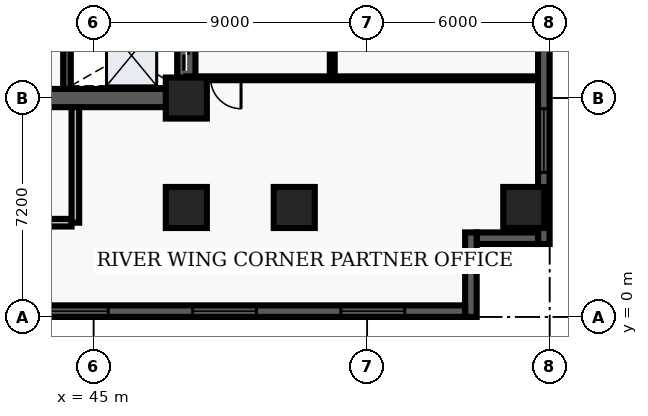
"""IFC4 building model, lengths in metres.
Left out: names, types, materials, properties, quantities, classifications, styles, units other than length and angle.
Written with IfcOpenShell. Run it as: python <this file> out.ifc"""

import sys

from ifc_helpers import new_model, entity, si_unit, converted_unit, direction, frame, origin_with_axes, origin_2d_with_axis, place, context, subcontext, project, spatial, polyline, rectangle, outline, extrude, element, fill, save


model = new_model("IFC4")
c1 = context("Model", 3, precision=1e-05, world=origin_with_axes(), true_north=direction((0.0, 1.0)))
c2 = subcontext(c1, "Body", "Model", "MODEL_VIEW")
j1 = project(units=[si_unit("LENGTHUNIT", "METRE"), converted_unit("PLANEANGLEUNIT", "DEGREE", entity("IfcPlaneAngleMeasure", 0.017), si_unit("PLANEANGLEUNIT", "RADIAN"), dimensions=[0, 0, 0, 0, 0, 0, 0])], contexts=[c1])
p1 = place(None, origin_with_axes())
s1 = spatial("IfcSite", under=j1, at=p1, CompositionType="ELEMENT")
p2 = place(p1, origin_with_axes())
s2 = spatial("IfcBuilding", under=s1, at=p2, CompositionType="ELEMENT")
p3 = place(p2, frame((0.0, 0.0, 52.2), z_axis=(0.0, 0.0, 1.0), x_axis=(1.0, 0.0, 0.0)))
s3 = spatial("IfcBuildingStorey", under=s2, at=p3, CompositionType="ELEMENT", Elevation=52.2)
p4 = place(p3, frame((40.2, 7.2, 0.0), z_axis=(0.0, 0.0, 1.0), x_axis=(1.0, 0.0, 0.0)))
e1 = element("IfcWall", 1, at=p4, inside=s3, PredefinedType="SHEAR", context=c2, shape_type="SweptSolid", body=[
    extrude(outline(polyline([(0.0, -0.3), (7.85, -0.3), (7.85, 0.3), (0.0, 0.3), (0.0, -0.3)])), origin_with_axes(), (0.0, 0.0, 1.0), 3.66),
])
p5 = place(p4, frame((2.175, 0.0, 0.0), z_axis=(0.0, 0.0, 1.0), x_axis=(1.0, 0.0, 0.0)))
e2 = element("IfcOpeningElement", 2, at=p5, cuts=e1, PredefinedType="OPENING", context=c2, shape_type="SweptSolid", body=[
    extrude(rectangle(XDim=1.05, YDim=0.62, at=origin_2d_with_axis()), origin_with_axes(), (0.0, 0.0, 1.0), 2.15),
])
p6 = place(p3, frame((48.05, 7.2, 0.0), z_axis=(0.0, 0.0, 1.0), x_axis=(0.0, 1.0, 0.0)))
e3 = element("IfcWall", 3, at=p6, inside=s3, PredefinedType="SHEAR", context=c2, shape_type="SweptSolid", body=[
    extrude(outline(polyline([(0.0, -0.3), (15.6, -0.3), (15.6, 0.3), (0.0, 0.3), (0.0, -0.3)])), origin_with_axes(), (0.0, 0.0, 1.0), 3.66),
])
p7 = place(p6, frame((1.425, 0.0, 0.0), z_axis=(0.0, 0.0, 1.0), x_axis=(1.0, 0.0, 0.0)))
e4 = element("IfcOpeningElement", 4, at=p7, cuts=e3, PredefinedType="OPENING", context=c2, shape_type="SweptSolid", body=[
    extrude(rectangle(XDim=1.05, YDim=0.62, at=origin_2d_with_axis()), origin_with_axes(), (0.0, 0.0, 1.0), 2.15),
])
p8 = place(p6, frame((3.475, 0.0, 0.0), z_axis=(0.0, 0.0, 1.0), x_axis=(1.0, 0.0, 0.0)))
e5 = element("IfcOpeningElement", 5, at=p8, cuts=e3, PredefinedType="OPENING", context=c2, shape_type="SweptSolid", body=[
    extrude(rectangle(XDim=1.05, YDim=0.62, at=origin_2d_with_axis()), origin_with_axes(), (0.0, 0.0, 1.0), 2.15),
])
p9 = place(p6, frame((5.625, 0.0, 0.0), z_axis=(0.0, 0.0, 1.0), x_axis=(1.0, 0.0, 0.0)))
e6 = element("IfcOpeningElement", 6, at=p9, cuts=e3, PredefinedType="OPENING", context=c2, shape_type="SweptSolid", body=[
    extrude(rectangle(XDim=0.95, YDim=0.62, at=origin_2d_with_axis()), origin_with_axes(), (0.0, 0.0, 1.0), 2.15),
])
p10 = place(p3, frame((44.125, 7.5, 0.0), z_axis=(0.0, 0.0, 1.0), x_axis=(0.0, 1.0, 0.0)))
e7 = element("IfcWall", 7, at=p10, inside=s3, PredefinedType="SHEAR", context=c2, shape_type="SweptSolid", body=[
    extrude(outline(polyline([(0.0, -0.125), (15.0, -0.125), (15.0, 0.125), (0.0, 0.125), (0.0, -0.125)])), origin_with_axes(), (0.0, 0.0, 1.0), 3.66),
])
p11 = place(p3, frame((40.325, 3.1, 0.0), z_axis=(0.0, 0.0, 1.0), x_axis=(1.0, 0.0, 0.0)))
e8 = element("IfcWall", 8, at=p11, inside=s3, PredefinedType="SOLIDWALL", context=c2, shape_type="SweptSolid", body=[
    extrude(outline(polyline([(0.0, -0.125), (3.95, -0.125), (3.95, 0.125), (0.0, 0.125), (0.0, -0.125)])), origin_with_axes(), (0.0, 0.0, 1.0), 2.7),
])
p12 = place(p3, frame((44.4, 3.1, 0.0), z_axis=(0.0, 0.0, 1.0), x_axis=(0.0, 1.0, 0.0)))
e9 = element("IfcWall", 9, at=p12, inside=s3, PredefinedType="SOLIDWALL", context=c2, shape_type="SweptSolid", body=[
    extrude(outline(polyline([(0.0, -0.125), (3.8, -0.125), (3.8, 0.125), (0.0, 0.125), (0.0, -0.125)])), origin_with_axes(), (0.0, 0.0, 1.0), 2.7),
])
for number, where, z_axis, x_axis in (
    (10, (48.05, 3.6, 0.0), (0.0, 0.0, 1.0), (1.0, 0.0, 0.0)),
    (11, (48.05, 7.2, 0.0), (0.0, 0.0, 1.0), (1.0, 0.0, 0.0)),
    (12, (51.6, 3.6, 0.0), (0.0, 0.0, 1.0), (1.0, 0.0, 0.0)),
    (13, (59.15, 3.6, 0.0), (0.0, 0.0, 1.0), (1.0, 0.0, 0.0)),
):
    element("IfcColumn", number, at=place(p3, frame(where, z_axis=z_axis, x_axis=x_axis)), inside=s3, PredefinedType="COLUMN", context=c2, shape_type="SweptSolid", body=[
        extrude(rectangle(XDim=1.35, YDim=1.35, at=origin_2d_with_axis()), origin_with_axes(), (0.0, 0.0, 1.0), 3.9),
    ])
p13 = place(p3, frame((52.85, 7.85, 0.0), z_axis=(0.0, 0.0, 1.0), x_axis=(0.0, 1.0, 0.0)))
e14 = element("IfcWall", 14, at=p13, inside=s3, PredefinedType="PARTITIONING", context=c2, shape_type="SweptSolid", body=[
    extrude(outline(polyline([(0.0, -0.08), (18.8, -0.08), (18.8, 0.08), (0.0, 0.08), (0.0, -0.08)])), origin_with_axes(), (0.0, 0.0, 1.0), 2.7),
])
p14 = place(p13, frame((4.484, 0.0, 0.0), z_axis=(0.0, 0.0, 1.0), x_axis=(1.0, 0.0, 0.0)))
e15 = element("IfcOpeningElement", 15, at=p14, cuts=e14, PredefinedType="OPENING", context=c2, shape_type="SweptSolid", body=[
    extrude(rectangle(XDim=1.0, YDim=0.18, at=origin_2d_with_axis()), origin_with_axes(), (0.0, 0.0, 1.0), 2.15),
])
p15 = place(p13, frame((7.687, 0.0, 0.0), z_axis=(0.0, 0.0, 1.0), x_axis=(1.0, 0.0, 0.0)))
e16 = element("IfcOpeningElement", 16, at=p15, cuts=e14, PredefinedType="OPENING", context=c2, shape_type="SweptSolid", body=[
    extrude(rectangle(XDim=1.0, YDim=0.18, at=origin_2d_with_axis()), origin_with_axes(), (0.0, 0.0, 1.0), 2.15),
])
p16 = place(p13, frame((13.79, 0.0, 0.0), z_axis=(0.0, 0.0, 1.0), x_axis=(1.0, 0.0, 0.0)))
e17 = element("IfcOpeningElement", 17, at=p16, cuts=e14, PredefinedType="OPENING", context=c2, shape_type="SweptSolid", body=[
    extrude(rectangle(XDim=1.0, YDim=0.18, at=origin_2d_with_axis()), origin_with_axes(), (0.0, 0.0, 1.0), 2.15),
])
p17 = place(p3, frame((59.64, 7.85, 0.0), z_axis=(0.0, 0.0, 1.0), x_axis=(-1.0, 0.0, 0.0)))
e18 = element("IfcWall", 18, at=p17, inside=s3, PredefinedType="PARTITIONING", context=c2, shape_type="SweptSolid", body=[
    extrude(outline(polyline([(0.0, -0.062), (11.59, -0.062), (11.59, 0.062), (0.0, 0.062), (0.0, -0.062)])), origin_with_axes(), (0.0, 0.0, 1.0), 2.7),
])
p18 = place(p17, frame((10.29, 0.0, 0.0), z_axis=(0.0, 0.0, 1.0), x_axis=(1.0, 0.0, 0.0)))
e19 = element("IfcOpeningElement", 19, at=p18, cuts=e18, PredefinedType="OPENING", context=c2, shape_type="SweptSolid", body=[
    extrude(rectangle(XDim=1.0, YDim=0.145, at=origin_2d_with_axis()), origin_with_axes(), (0.0, 0.0, 1.0), 2.15),
])
p19 = place(p3, frame((59.81, 26.02, 0.0), z_axis=(0.0, 0.0, 1.0), x_axis=(0.0, -1.0, 0.0)))
e20 = element("IfcWall", 20, at=p19, inside=s3, PredefinedType="SOLIDWALL", context=c2, shape_type="SweptSolid", body=[
    extrude(outline(polyline([(0.0, -0.19), (23.62, -0.19), (23.62, 0.19), (0.0, 0.19), (0.0, -0.19)])), origin_with_axes(), (0.0, 0.0, 1.0), 3.66),
])
p20 = place(p19, frame((3.853, 0.0, 0.45), z_axis=(0.0, 0.0, 1.0), x_axis=(1.0, 0.0, 0.0)))
e21 = element("IfcOpeningElement", 21, at=p20, cuts=e20, PredefinedType="OPENING", context=c2, shape_type="SweptSolid", body=[
    extrude(rectangle(XDim=2.1, YDim=0.4, at=origin_2d_with_axis()), origin_with_axes(), (0.0, 0.0, 1.0), 2.2),
])
p21 = place(p19, frame((20.218, 0.0, 0.45), z_axis=(0.0, 0.0, 1.0), x_axis=(1.0, 0.0, 0.0)))
e22 = element("IfcOpeningElement", 22, at=p21, cuts=e20, PredefinedType="OPENING", context=c2, shape_type="SweptSolid", body=[
    extrude(rectangle(XDim=2.1, YDim=0.4, at=origin_2d_with_axis()), origin_with_axes(), (0.0, 0.0, 1.0), 2.2),
])
p22 = place(p3, frame((59.62, 2.59, 0.0), z_axis=(0.0, 0.0, 1.0), x_axis=(-1.0, 0.0, 0.0)))
e23 = element("IfcWall", 23, at=p22, inside=s3, PredefinedType="SOLIDWALL", context=c2, shape_type="SweptSolid", body=[
    extrude(outline(polyline([(0.0, -0.19), (2.02, -0.19), (2.02, 0.19), (0.0, 0.19), (0.0, -0.19)])), origin_with_axes(), (0.0, 0.0, 1.0), 3.66),
])
p23 = place(p3, frame((57.41, 2.78, 0.0), z_axis=(0.0, 0.0, 1.0), x_axis=(0.0, -1.0, 0.0)))
e24 = element("IfcWall", 24, at=p23, inside=s3, PredefinedType="SOLIDWALL", context=c2, shape_type="SweptSolid", body=[
    extrude(outline(polyline([(0.0, -0.19), (2.78, -0.19), (2.78, 0.19), (0.0, 0.19), (0.0, -0.19)])), origin_with_axes(), (0.0, 0.0, 1.0), 3.66),
])
p24 = place(p3, frame((57.22, 0.19, 0.0), z_axis=(0.0, 0.0, 1.0), x_axis=(-1.0, 0.0, 0.0)))
e25 = element("IfcWall", 25, at=p24, inside=s3, PredefinedType="SOLIDWALL", context=c2, shape_type="SweptSolid", body=[
    extrude(outline(polyline([(0.0, -0.19), (54.82, -0.19), (54.82, 0.19), (0.0, 0.19), (0.0, -0.19)])), origin_with_axes(), (0.0, 0.0, 1.0), 3.66),
])
p25 = place(p24, frame((3.037, 0.0, 0.45), z_axis=(0.0, 0.0, 1.0), x_axis=(1.0, 0.0, 0.0)))
e26 = element("IfcOpeningElement", 26, at=p25, cuts=e25, PredefinedType="OPENING", context=c2, shape_type="SweptSolid", body=[
    extrude(rectangle(XDim=2.1, YDim=0.4, at=origin_2d_with_axis()), origin_with_axes(), (0.0, 0.0, 1.0), 2.2),
])
p26 = place(p24, frame((7.912, 0.0, 0.45), z_axis=(0.0, 0.0, 1.0), x_axis=(1.0, 0.0, 0.0)))
e27 = element("IfcOpeningElement", 27, at=p26, cuts=e25, PredefinedType="OPENING", context=c2, shape_type="SweptSolid", body=[
    extrude(rectangle(XDim=2.1, YDim=0.4, at=origin_2d_with_axis()), origin_with_axes(), (0.0, 0.0, 1.0), 2.2),
])
p27 = place(p24, frame((12.786, 0.0, 0.45), z_axis=(0.0, 0.0, 1.0), x_axis=(1.0, 0.0, 0.0)))
e28 = element("IfcOpeningElement", 28, at=p27, cuts=e25, PredefinedType="OPENING", context=c2, shape_type="SweptSolid", body=[
    extrude(rectangle(XDim=2.1, YDim=0.4, at=origin_2d_with_axis()), origin_with_axes(), (0.0, 0.0, 1.0), 2.2),
])
p28 = place(p24, frame((17.661, 0.0, 0.45), z_axis=(0.0, 0.0, 1.0), x_axis=(1.0, 0.0, 0.0)))
e29 = element("IfcOpeningElement", 29, at=p28, cuts=e25, PredefinedType="OPENING", context=c2, shape_type="SweptSolid", body=[
    extrude(rectangle(XDim=2.1, YDim=0.4, at=origin_2d_with_axis()), origin_with_axes(), (0.0, 0.0, 1.0), 2.2),
])
p29 = place(p24, frame((22.535, 0.0, 0.45), z_axis=(0.0, 0.0, 1.0), x_axis=(1.0, 0.0, 0.0)))
e30 = element("IfcOpeningElement", 30, at=p29, cuts=e25, PredefinedType="OPENING", context=c2, shape_type="SweptSolid", body=[
    extrude(rectangle(XDim=2.1, YDim=0.4, at=origin_2d_with_axis()), origin_with_axes(), (0.0, 0.0, 1.0), 2.2),
])
p30 = place(p24, frame((27.41, 0.0, 0.45), z_axis=(0.0, 0.0, 1.0), x_axis=(1.0, 0.0, 0.0)))
e31 = element("IfcOpeningElement", 31, at=p30, cuts=e25, PredefinedType="OPENING", context=c2, shape_type="SweptSolid", body=[
    extrude(rectangle(XDim=2.1, YDim=0.4, at=origin_2d_with_axis()), origin_with_axes(), (0.0, 0.0, 1.0), 2.2),
])
p31 = place(p24, frame((32.285, 0.0, 0.45), z_axis=(0.0, 0.0, 1.0), x_axis=(1.0, 0.0, 0.0)))
e32 = element("IfcOpeningElement", 32, at=p31, cuts=e25, PredefinedType="OPENING", context=c2, shape_type="SweptSolid", body=[
    extrude(rectangle(XDim=2.1, YDim=0.4, at=origin_2d_with_axis()), origin_with_axes(), (0.0, 0.0, 1.0), 2.2),
])
p32 = place(p24, frame((37.159, 0.0, 0.45), z_axis=(0.0, 0.0, 1.0), x_axis=(1.0, 0.0, 0.0)))
e33 = element("IfcOpeningElement", 33, at=p32, cuts=e25, PredefinedType="OPENING", context=c2, shape_type="SweptSolid", body=[
    extrude(rectangle(XDim=2.1, YDim=0.4, at=origin_2d_with_axis()), origin_with_axes(), (0.0, 0.0, 1.0), 2.2),
])
p33 = place(p24, frame((46.908, 0.0, 0.45), z_axis=(0.0, 0.0, 1.0), x_axis=(1.0, 0.0, 0.0)))
e34 = element("IfcOpeningElement", 34, at=p33, cuts=e25, PredefinedType="OPENING", context=c2, shape_type="SweptSolid", body=[
    extrude(rectangle(XDim=2.1, YDim=0.4, at=origin_2d_with_axis()), origin_with_axes(), (0.0, 0.0, 1.0), 2.2),
])
p34 = place(p24, frame((51.783, 0.0, 0.45), z_axis=(0.0, 0.0, 1.0), x_axis=(1.0, 0.0, 0.0)))
e35 = element("IfcOpeningElement", 35, at=p34, cuts=e25, PredefinedType="OPENING", context=c2, shape_type="SweptSolid", body=[
    extrude(rectangle(XDim=2.1, YDim=0.4, at=origin_2d_with_axis()), origin_with_axes(), (0.0, 0.0, 1.0), 2.2),
])
p35 = place(p6, frame((1.425, 0.0, 0.0), z_axis=(0.0, 0.0, 1.0), x_axis=(1.0, 0.0, 0.0)))
e36 = element("IfcDoor", 36, at=p35, inside=s3, OperationType="SLIDING_TO_LEFT", PredefinedType="DOOR", context=c2, shape_type="SweptSolid", body=[
    extrude(rectangle(XDim=1.05, YDim=0.09, at=origin_2d_with_axis()), origin_with_axes(), (0.0, 0.0, 1.0), 2.15),
])
fill(e4, e36)
p36 = place(p17, frame((10.29, 0.0, 0.0), z_axis=(0.0, 0.0, 1.0), x_axis=(1.0, 0.0, 0.0)))
e37 = element("IfcDoor", 37, at=p36, inside=s3, OperationType="SINGLE_SWING_LEFT", PredefinedType="DOOR", context=c2, shape_type="SweptSolid", body=[
    extrude(rectangle(XDim=1.0, YDim=0.075, at=origin_2d_with_axis()), origin_with_axes(), (0.0, 0.0, 1.0), 2.15),
])
fill(e19, e37)
p37 = place(p19, frame((20.218, 0.0, 0.45), z_axis=(0.0, 0.0, 1.0), x_axis=(1.0, 0.0, 0.0)))
e38 = element("IfcWindow", 38, at=p37, inside=s3, PredefinedType="WINDOW", context=c2, shape_type="SweptSolid", body=[
    extrude(rectangle(XDim=2.1, YDim=0.09, at=origin_2d_with_axis()), origin_with_axes(), (0.0, 0.0, 1.0), 2.2),
])
fill(e22, e38)
p38 = place(p24, frame((3.037, 0.0, 0.45), z_axis=(0.0, 0.0, 1.0), x_axis=(1.0, 0.0, 0.0)))
e39 = element("IfcWindow", 39, at=p38, inside=s3, PredefinedType="WINDOW", context=c2, shape_type="SweptSolid", body=[
    extrude(rectangle(XDim=2.1, YDim=0.09, at=origin_2d_with_axis()), origin_with_axes(), (0.0, 0.0, 1.0), 2.2),
])
fill(e26, e39)
p39 = place(p24, frame((7.912, 0.0, 0.45), z_axis=(0.0, 0.0, 1.0), x_axis=(1.0, 0.0, 0.0)))
e40 = element("IfcWindow", 40, at=p39, inside=s3, PredefinedType="WINDOW", context=c2, shape_type="SweptSolid", body=[
    extrude(rectangle(XDim=2.1, YDim=0.09, at=origin_2d_with_axis()), origin_with_axes(), (0.0, 0.0, 1.0), 2.2),
])
fill(e27, e40)
p40 = place(p24, frame((12.786, 0.0, 0.45), z_axis=(0.0, 0.0, 1.0), x_axis=(1.0, 0.0, 0.0)))
e41 = element("IfcWindow", 41, at=p40, inside=s3, PredefinedType="WINDOW", context=c2, shape_type="SweptSolid", body=[
    extrude(rectangle(XDim=2.1, YDim=0.09, at=origin_2d_with_axis()), origin_with_axes(), (0.0, 0.0, 1.0), 2.2),
])
fill(e28, e41)
save(model, sys.argv[1])
